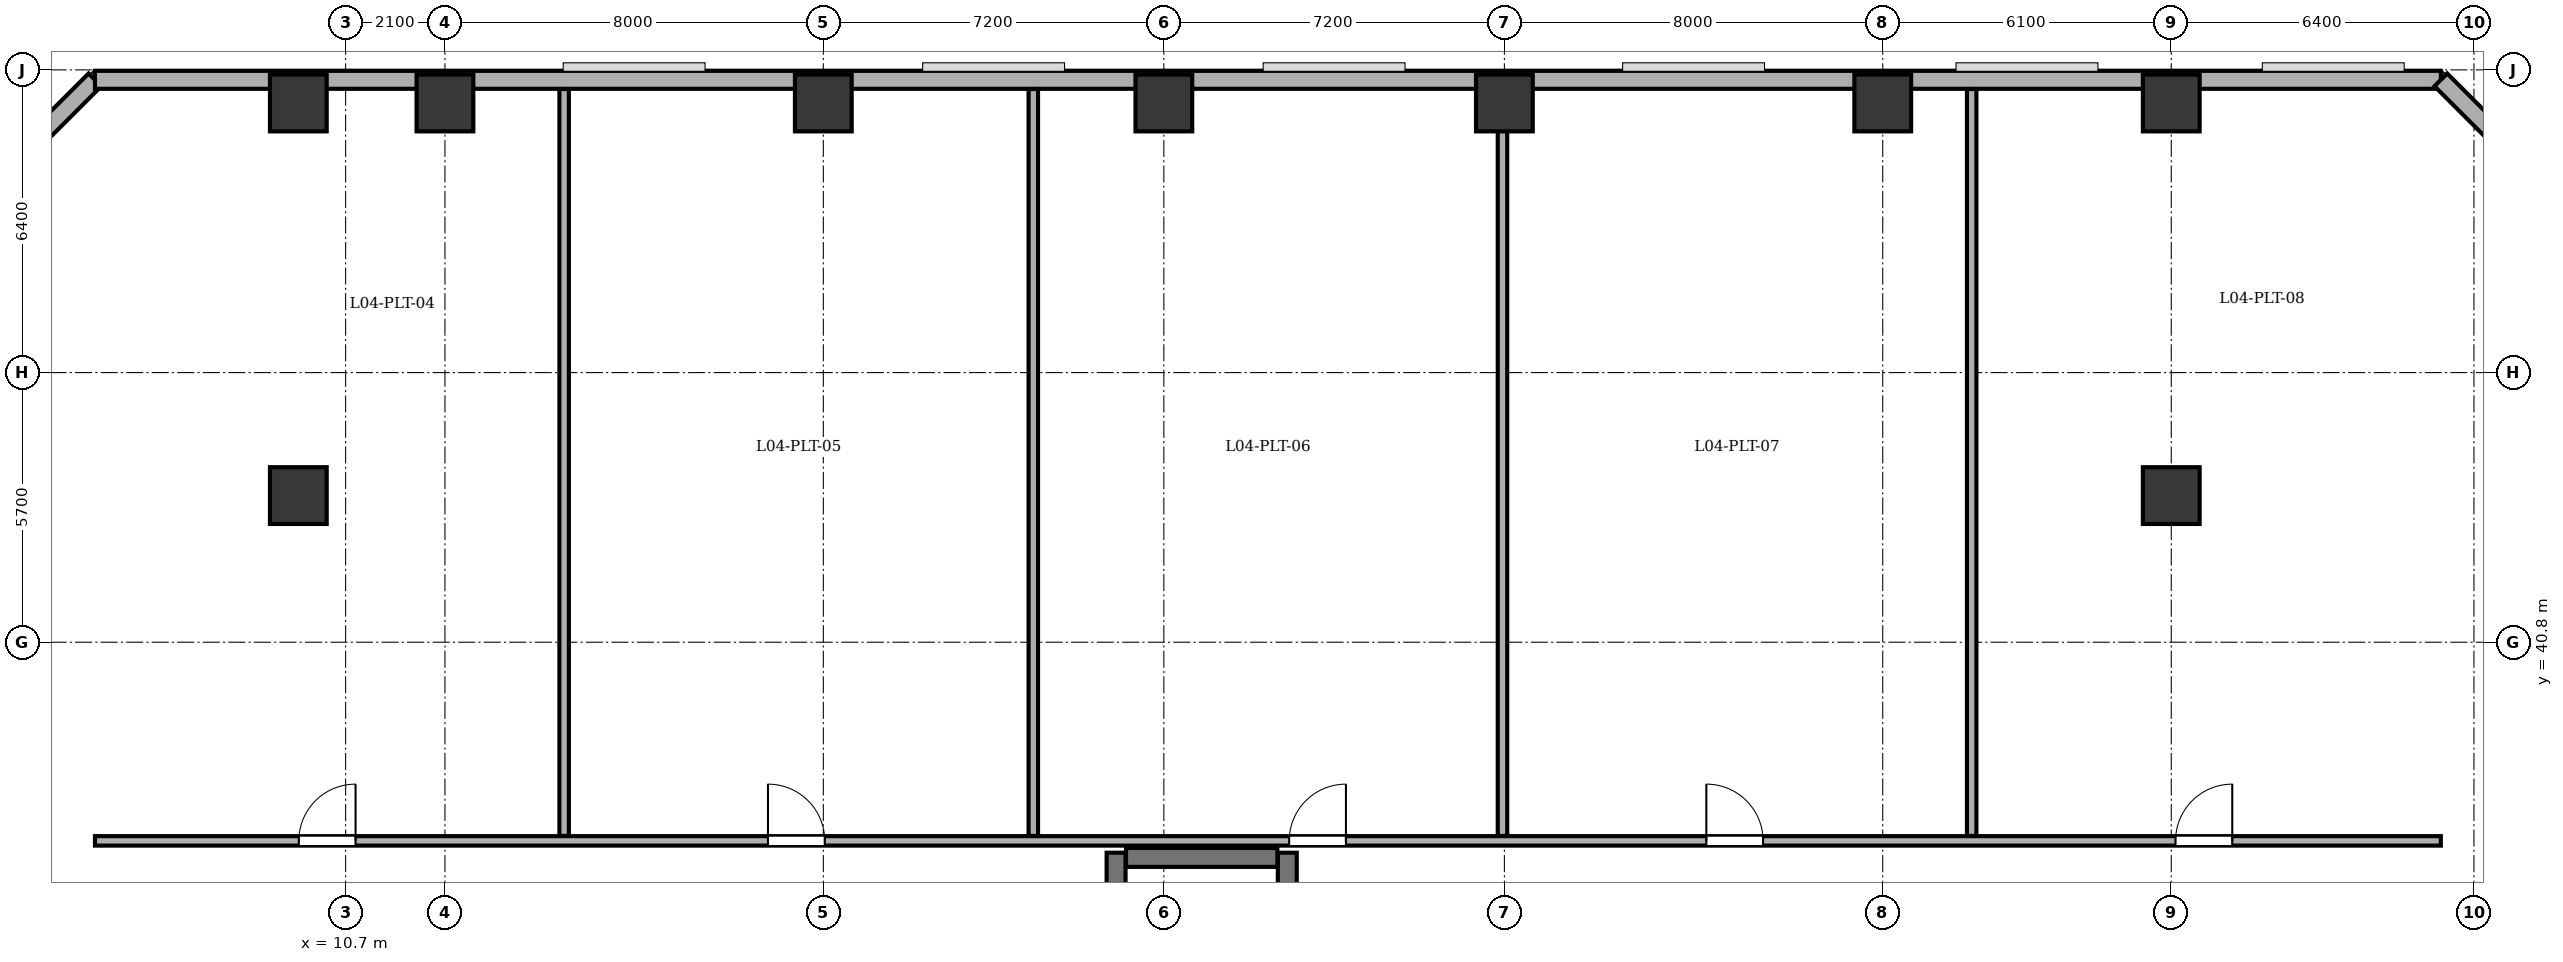
"""IFC4 building model, lengths in metres.
Left out: names, types, materials, properties, quantities, classifications, styles, units other than length and angle.
Written with IfcOpenShell. Run it as: python <this file> out.ifc"""

import sys

from ifc_helpers import new_model, si_unit, direction, frame, frame_2d, origin, origin_2d, place, context, subcontext, project, spatial, rectangle, extrude, element, fill, save


model = new_model("IFC4")
c1 = context("Model", 3, precision=1e-05, world=origin(), true_north=direction((0.0, 1.0)))
c2 = subcontext(c1, "Body", "Model", "MODEL_VIEW")
j1 = project(units=[si_unit("LENGTHUNIT", "METRE"), si_unit("PLANEANGLEUNIT", "RADIAN")], contexts=[c1])
p1 = place(None, origin())
s1 = spatial("IfcSite", under=j1, at=p1, CompositionType="ELEMENT")
p2 = place(p1, origin())
s2 = spatial("IfcBuilding", under=s1, at=p2, CompositionType="ELEMENT")
p3 = place(p2, frame((0.0, 0.0, 18.9)))
s3 = spatial("IfcBuildingStorey", under=s2, at=p3, CompositionType="ELEMENT", Elevation=18.9)
for number, where, z_axis, x_axis in (
    (1, (9.7, 52.2, 0.0), (0.0, 0.0, 1.0), (1.0, 0.0, 0.0)),
    (2, (12.8, 52.2, 0.0), (0.0, 0.0, 1.0), (1.0, 0.0, 0.0)),
    (3, (20.8, 52.2, 0.0), (0.0, 0.0, 1.0), (1.0, 0.0, 0.0)),
    (4, (28.0, 52.2, 0.0), (0.0, 0.0, 1.0), (1.0, 0.0, 0.0)),
    (5, (35.2, 52.2, 0.0), (0.0, 0.0, 1.0), (1.0, 0.0, 0.0)),
    (6, (43.2, 52.2, 0.0), (0.0, 0.0, 1.0), (1.0, 0.0, 0.0)),
    (7, (49.3, 52.2, 0.0), (0.0, 0.0, 1.0), (1.0, 0.0, 0.0)),
    (8, (9.7, 43.9, 0.0), (0.0, 0.0, 1.0), (1.0, 0.0, 0.0)),
    (9, (49.3, 43.9, 0.0), (0.0, 0.0, 1.0), (1.0, 0.0, 0.0)),
):
    element("IfcColumn", number, at=place(p3, frame(where, z_axis=z_axis, x_axis=x_axis)), inside=s3, PredefinedType="COLUMN", context=c2, shape_type="SweptSolid", body=[
        extrude(rectangle(XDim=1.2, YDim=1.2, at=origin_2d()), origin(), (0.0, 0.0, 1.0), 5.4),
    ])
p4 = place(p3, frame((2.61, 49.9, 0.0), z_axis=(0.0, 0.0, 1.0), x_axis=(0.707075841688, 0.707137719332, 0.0)))
e10 = element("IfcWall", 10, at=p4, inside=s3, PredefinedType="STANDARD", context=c2, shape_type="SweptSolid", body=[
    extrude(rectangle(XDim=3.946, YDim=0.38, at=frame_2d((1.973, 0.0))), origin(), (0.0, 0.0, 1.0), 4.95),
])
p5 = place(p3, frame((5.4, 52.69, 0.0), z_axis=(0.0, 0.0, 1.0), x_axis=(1.0, 0.0, 0.0)))
e11 = element("IfcWall", 11, at=p5, inside=s3, PredefinedType="STANDARD", context=c2, shape_type="SweptSolid", body=[
    extrude(rectangle(XDim=49.6, YDim=0.38, at=frame_2d((24.8, 0.0))), origin(), (0.0, 0.0, 1.0), 4.95),
])
p6 = place(p3, frame((55.0, 52.69, 0.0), z_axis=(0.0, 0.0, 1.0), x_axis=(0.707106781187, -0.707106781187, 0.0)))
e12 = element("IfcWall", 12, at=p6, inside=s3, PredefinedType="STANDARD", context=c2, shape_type="SweptSolid", body=[
    extrude(rectangle(XDim=3.946, YDim=0.38, at=frame_2d((1.973, 0.0))), origin(), (0.0, 0.0, 1.0), 4.95),
])
p7 = place(p3, frame((26.99, 28.75, 0.0), z_axis=(0.0, 0.0, 1.0), x_axis=(0.0, 1.0, 0.0)))
e13 = element("IfcWall", 13, at=p7, inside=s3, PredefinedType="SHEAR", context=c2, shape_type="SweptSolid", body=[
    extrude(rectangle(XDim=7.6, YDim=0.4, at=frame_2d((3.8, 0.0))), origin(), (0.0, 0.0, 1.0), 4.95),
])
p8 = place(p3, frame((30.61, 28.75, 0.0), z_axis=(0.0, 0.0, 1.0), x_axis=(0.0, 1.0, 0.0)))
e14 = element("IfcWall", 14, at=p8, inside=s3, PredefinedType="SHEAR", context=c2, shape_type="SweptSolid", body=[
    extrude(rectangle(XDim=7.6, YDim=0.4, at=frame_2d((3.8, 0.0))), origin(), (0.0, 0.0, 1.0), 4.95),
])
p9 = place(p8, frame((5.7, 0.0, 0.0)))
e15 = element("IfcOpeningElement", 15, at=p9, cuts=e14, PredefinedType="OPENING", context=c2, shape_type="SweptSolid", body=[
    extrude(rectangle(XDim=1.15, YDim=2.15, at=frame_2d((0.575, 1.075))), frame((0.0, 0.21, 0.0), z_axis=(0.0, -1.0, 0.0), x_axis=(1.0, 0.0, 0.0)), (0.0, 0.0, 1.0), 0.42),
])
p10 = place(p3, frame((27.2, 36.25, 0.0), z_axis=(0.0, 0.0, 1.0), x_axis=(1.0, 0.0, 0.0)))
e16 = element("IfcWall", 16, at=p10, inside=s3, PredefinedType="SHEAR", context=c2, shape_type="SweptSolid", body=[
    extrude(rectangle(XDim=3.2, YDim=0.4, at=frame_2d((1.6, 0.0))), origin(), (0.0, 0.0, 1.0), 4.95),
])
p11 = place(p3, frame((5.4, 36.6, 0.0), z_axis=(0.0, 0.0, 1.0), x_axis=(1.0, 0.0, 0.0)))
e17 = element("IfcWall", 17, at=p11, inside=s3, PredefinedType="SOLIDWALL", context=c2, shape_type="SweptSolid", body=[
    extrude(rectangle(XDim=49.6, YDim=0.2, at=frame_2d((24.8, 0.0))), origin(), (0.0, 0.0, 1.0), 4.95),
])
p12 = place(p11, frame((4.31, 0.0, 0.0)))
e18 = element("IfcOpeningElement", 18, at=p12, cuts=e17, PredefinedType="OPENING", context=c2, shape_type="SweptSolid", body=[
    extrude(rectangle(XDim=1.2, YDim=2.15, at=frame_2d((0.6, 1.075))), frame((0.0, 0.11, 0.0), z_axis=(0.0, -1.0, 0.0), x_axis=(1.0, 0.0, 0.0)), (0.0, 0.0, 1.0), 0.22),
])
p13 = place(p11, frame((14.23, 0.0, 0.0)))
e19 = element("IfcOpeningElement", 19, at=p13, cuts=e17, PredefinedType="OPENING", context=c2, shape_type="SweptSolid", body=[
    extrude(rectangle(XDim=1.2, YDim=2.15, at=frame_2d((0.6, 1.075))), frame((0.0, 0.11, 0.0), z_axis=(0.0, -1.0, 0.0), x_axis=(1.0, 0.0, 0.0)), (0.0, 0.0, 1.0), 0.22),
])
p14 = place(p11, frame((25.25, 0.0, 0.0)))
e20 = element("IfcOpeningElement", 20, at=p14, cuts=e17, PredefinedType="OPENING", context=c2, shape_type="SweptSolid", body=[
    extrude(rectangle(XDim=1.2, YDim=2.15, at=frame_2d((0.6, 1.075))), frame((0.0, 0.11, 0.0), z_axis=(0.0, -1.0, 0.0), x_axis=(1.0, 0.0, 0.0)), (0.0, 0.0, 1.0), 0.22),
])
p15 = place(p11, frame((34.07, 0.0, 0.0)))
e21 = element("IfcOpeningElement", 21, at=p15, cuts=e17, PredefinedType="OPENING", context=c2, shape_type="SweptSolid", body=[
    extrude(rectangle(XDim=1.2, YDim=2.15, at=frame_2d((0.6, 1.075))), frame((0.0, 0.11, 0.0), z_axis=(0.0, -1.0, 0.0), x_axis=(1.0, 0.0, 0.0)), (0.0, 0.0, 1.0), 0.22),
])
p16 = place(p11, frame((43.99, 0.0, 0.0)))
e22 = element("IfcOpeningElement", 22, at=p16, cuts=e17, PredefinedType="OPENING", context=c2, shape_type="SweptSolid", body=[
    extrude(rectangle(XDim=1.2, YDim=2.15, at=frame_2d((0.6, 1.075))), frame((0.0, 0.11, 0.0), z_axis=(0.0, -1.0, 0.0), x_axis=(1.0, 0.0, 0.0)), (0.0, 0.0, 1.0), 0.22),
])
for number, where, z_axis, x_axis in (
    (23, (15.32, 36.705, 0.0), (0.0, 0.0, 1.0), (0.0, 1.0, 0.0)),
    (24, (25.24, 36.705, 0.0), (0.0, 0.0, 1.0), (0.0, 1.0, 0.0)),
):
    element("IfcWall", number, at=place(p3, frame(where, z_axis=z_axis, x_axis=x_axis)), inside=s3, PredefinedType="SOLIDWALL", context=c2, shape_type="SweptSolid", body=[
        extrude(rectangle(XDim=15.79, YDim=0.2, at=frame_2d((7.895, 0.0))), origin(), (0.0, 0.0, 1.0), 4.95),
    ])
p17 = place(p3, frame((35.16, 36.705, 0.0), z_axis=(0.0, 0.0, 1.0), x_axis=(0.0, 1.0, 0.0)))
e25 = element("IfcWall", 25, at=p17, inside=s3, PredefinedType="SOLIDWALL", context=c2, shape_type="SweptSolid", body=[
    extrude(rectangle(XDim=15.79, YDim=0.2, at=frame_2d((7.895, 0.0))), origin(), (0.0, 0.0, 1.0), 4.035),
])
p18 = place(p3, frame((45.08, 36.705, 0.0), z_axis=(0.0, 0.0, 1.0), x_axis=(0.0, 1.0, 0.0)))
e26 = element("IfcWall", 26, at=p18, inside=s3, PredefinedType="SOLIDWALL", context=c2, shape_type="SweptSolid", body=[
    extrude(rectangle(XDim=15.79, YDim=0.2, at=frame_2d((7.895, 0.0))), origin(), (0.0, 0.0, 1.0), 4.95),
])
p19 = place(p12, origin())
e27 = element("IfcDoor", 27, at=p19, inside=s3, OperationType="SINGLE_SWING_RIGHT", PredefinedType="DOOR", context=c2, shape_type="SweptSolid", body=[
    extrude(rectangle(XDim=1.2, YDim=2.15, at=frame_2d((0.6, 1.075))), frame((0.0, 0.025, 0.0), z_axis=(0.0, -1.0, 0.0), x_axis=(1.0, 0.0, 0.0)), (0.0, 0.0, 1.0), 0.05),
])
fill(e18, e27)
p20 = place(p13, origin())
e28 = element("IfcDoor", 28, at=p20, inside=s3, OperationType="SINGLE_SWING_LEFT", PredefinedType="DOOR", context=c2, shape_type="SweptSolid", body=[
    extrude(rectangle(XDim=1.2, YDim=2.15, at=frame_2d((0.6, 1.075))), frame((0.0, 0.025, 0.0), z_axis=(0.0, -1.0, 0.0), x_axis=(1.0, 0.0, 0.0)), (0.0, 0.0, 1.0), 0.05),
])
fill(e19, e28)
p21 = place(p14, origin())
e29 = element("IfcDoor", 29, at=p21, inside=s3, OperationType="SINGLE_SWING_RIGHT", PredefinedType="DOOR", context=c2, shape_type="SweptSolid", body=[
    extrude(rectangle(XDim=1.2, YDim=2.15, at=frame_2d((0.6, 1.075))), frame((0.0, 0.025, 0.0), z_axis=(0.0, -1.0, 0.0), x_axis=(1.0, 0.0, 0.0)), (0.0, 0.0, 1.0), 0.05),
])
fill(e20, e29)
p22 = place(p15, origin())
e30 = element("IfcDoor", 30, at=p22, inside=s3, OperationType="SINGLE_SWING_LEFT", PredefinedType="DOOR", context=c2, shape_type="SweptSolid", body=[
    extrude(rectangle(XDim=1.2, YDim=2.15, at=frame_2d((0.6, 1.075))), frame((0.0, 0.025, 0.0), z_axis=(0.0, -1.0, 0.0), x_axis=(1.0, 0.0, 0.0)), (0.0, 0.0, 1.0), 0.05),
])
fill(e21, e30)
p23 = place(p16, origin())
e31 = element("IfcDoor", 31, at=p23, inside=s3, OperationType="SINGLE_SWING_RIGHT", PredefinedType="DOOR", context=c2, shape_type="SweptSolid", body=[
    extrude(rectangle(XDim=1.2, YDim=2.15, at=frame_2d((0.6, 1.075))), frame((0.0, 0.025, 0.0), z_axis=(0.0, -1.0, 0.0), x_axis=(1.0, 0.0, 0.0)), (0.0, 0.0, 1.0), 0.05),
])
fill(e22, e31)
save(model, sys.argv[1])
